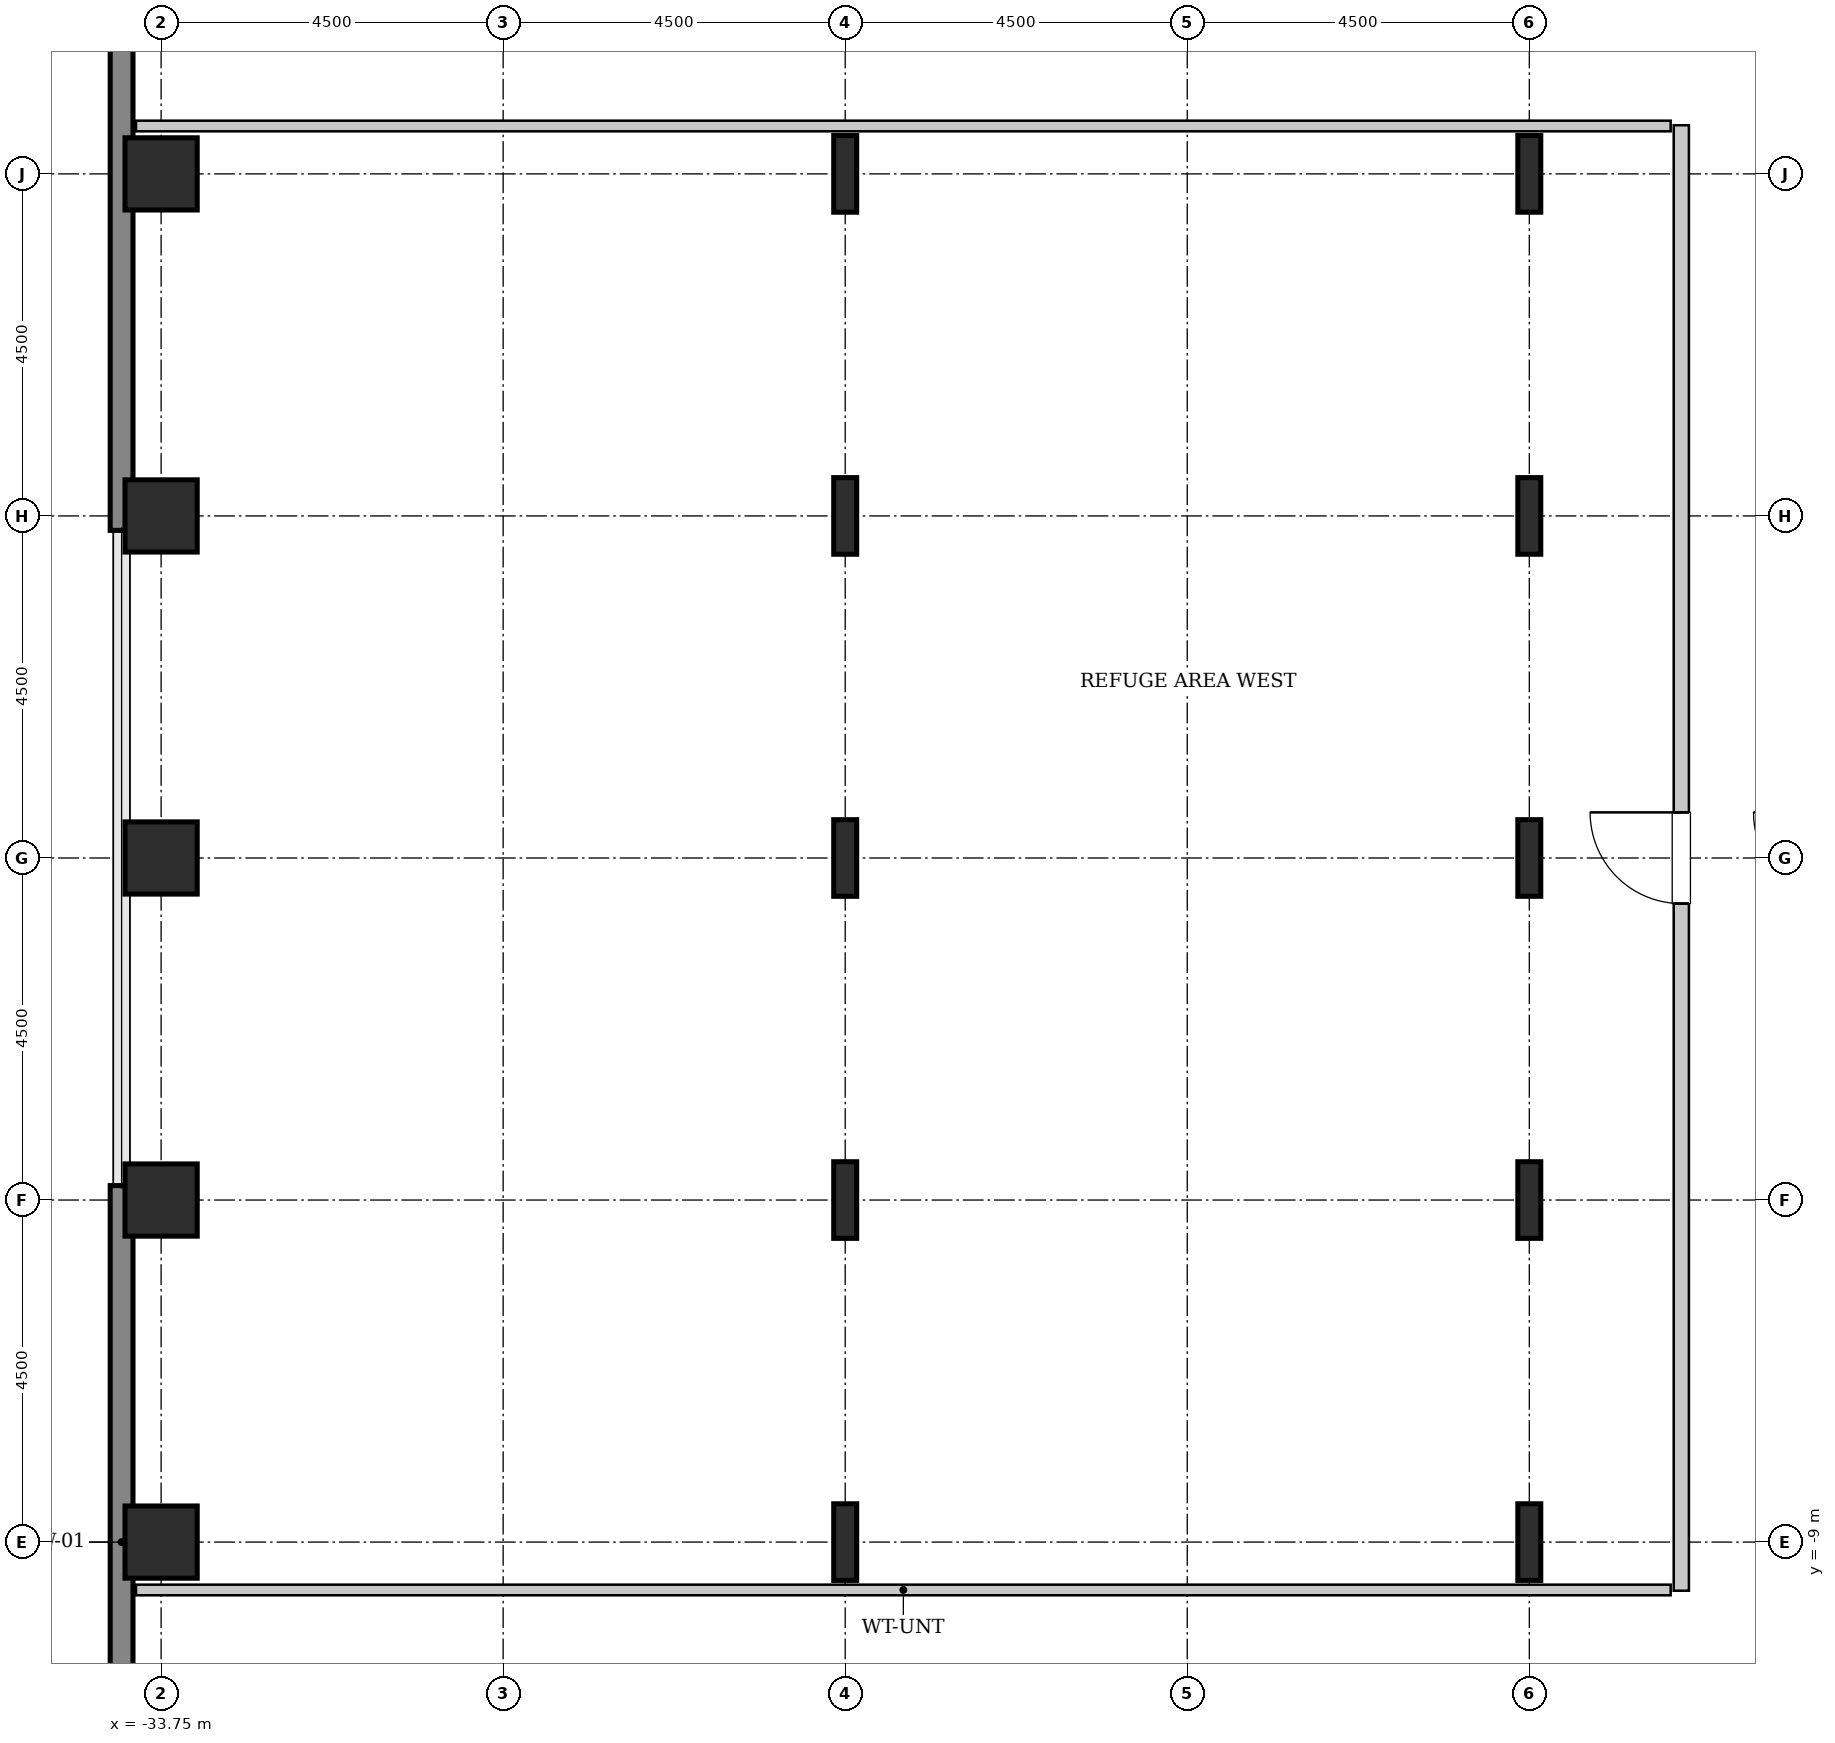
"""IFC4 building model, lengths in metres.
Left out: names, types, materials, properties, quantities, classifications, styles, units other than length and angle.
Written with IfcOpenShell. Run it as: python <this file> out.ifc"""

import sys

from ifc_helpers import new_model, si_unit, direction, frame, frame_2d, origin, origin_2d, place, context, subcontext, project, spatial, rectangle, hollow_rectangle, i_section, extrude, source, transform, mapped, element, fill, save


model = new_model("IFC4")
c1 = context("Model", 3, precision=1e-05, world=origin(), true_north=direction((0.0, 1.0)))
c2 = subcontext(c1, "Body", "Model", "MODEL_VIEW")
j1 = project(units=[si_unit("LENGTHUNIT", "METRE"), si_unit("PLANEANGLEUNIT", "RADIAN")], contexts=[c1])
p1 = place(None, origin())
s1 = spatial("IfcSite", under=j1, at=p1, CompositionType="ELEMENT")
p2 = place(p1, origin())
s2 = spatial("IfcBuilding", under=s1, at=p2, CompositionType="ELEMENT")
p3 = place(p2, frame((0.0, 0.0, 86.2)))
s3 = spatial("IfcBuildingStorey", under=s2, at=p3, CompositionType="ELEMENT", Elevation=86.2)
m1 = source(origin(), c2, "Body", "SweptSolid", [
    extrude(hollow_rectangle(XDim=0.95, YDim=0.95, WallThickness=0.045, InnerFilletRadius=0.045, OuterFilletRadius=0.09, at=origin_2d()), origin(), (0.0, 0.0, 1.0), 4.6),
])
for number, where, z_axis, x_axis in (
    (1, (-33.75, -9.0, 0.0), (0.0, 0.0, 1.0), (1.0, 0.0, 0.0)),
    (2, (-33.75, -4.5, 0.0), (0.0, 0.0, 1.0), (1.0, 0.0, 0.0)),
    (3, (-33.75, 0.0, 0.0), (0.0, 0.0, 1.0), (1.0, 0.0, 0.0)),
    (4, (-33.75, 4.5, 0.0), (0.0, 0.0, 1.0), (1.0, 0.0, 0.0)),
    (5, (-33.75, 9.0, 0.0), (0.0, 0.0, 1.0), (1.0, 0.0, 0.0)),
):
    element("IfcColumn", number, at=place(p3, frame(where, z_axis=z_axis, x_axis=x_axis)), inside=s3, PredefinedType="COLUMN", context=c2, shape_type="MappedRepresentation", body=[
        mapped(m1, transform((0.0, 0.0, 0.0), x_axis=(1.0, 0.0, 0.0), y_axis=(0.0, 1.0, 0.0), z_axis=(0.0, 0.0, 1.0), scale=1.0)),
    ])
m2 = source(origin(), c2, "Body", "SweptSolid", [
    extrude(i_section(OverallWidth=0.302, OverallDepth=1.008, WebThickness=0.021, FlangeThickness=0.04, FilletRadius=0.03, at=origin_2d()), origin(), (0.0, 0.0, 1.0), 4.6),
])
for number, where, z_axis, x_axis in (
    (6, (-24.75, -9.0, 0.0), (0.0, 0.0, 1.0), (1.0, 0.0, 0.0)),
    (7, (-24.75, -4.5, 0.0), (0.0, 0.0, 1.0), (1.0, 0.0, 0.0)),
    (8, (-24.75, 0.0, 0.0), (0.0, 0.0, 1.0), (1.0, 0.0, 0.0)),
    (9, (-24.75, 4.5, 0.0), (0.0, 0.0, 1.0), (1.0, 0.0, 0.0)),
    (10, (-24.75, 9.0, 0.0), (0.0, 0.0, 1.0), (1.0, 0.0, 0.0)),
    (11, (-15.75, -9.0, 0.0), (0.0, 0.0, 1.0), (1.0, 0.0, 0.0)),
    (12, (-15.75, -4.5, 0.0), (0.0, 0.0, 1.0), (1.0, 0.0, 0.0)),
    (13, (-15.75, 0.0, 0.0), (0.0, 0.0, 1.0), (1.0, 0.0, 0.0)),
    (14, (-15.75, 4.5, 0.0), (0.0, 0.0, 1.0), (1.0, 0.0, 0.0)),
    (15, (-15.75, 9.0, 0.0), (0.0, 0.0, 1.0), (1.0, 0.0, 0.0)),
):
    element("IfcColumn", number, at=place(p3, frame(where, z_axis=z_axis, x_axis=x_axis)), inside=s3, PredefinedType="COLUMN", context=c2, shape_type="MappedRepresentation", body=[
        mapped(m2, transform((0.0, 0.0, 0.0), x_axis=(1.0, 0.0, 0.0), y_axis=(0.0, 1.0, 0.0), z_axis=(0.0, 0.0, 1.0), scale=1.0)),
    ])
m3 = source(origin(), c2, "Body", "SweptSolid", [
    extrude(rectangle(XDim=9.38, YDim=0.3, at=frame_2d((4.69, 0.0))), origin(), (0.0, 0.0, 1.0), 4.35),
])
for number, where, z_axis, x_axis in (
    (16, (-34.27, -13.69, 0.0), (0.0, 0.0, 1.0), (0.0, 1.0, 0.0)),
    (17, (-34.27, 4.31, 0.0), (0.0, 0.0, 1.0), (0.0, 1.0, 0.0)),
):
    element("IfcWall", number, at=place(p3, frame(where, z_axis=z_axis, x_axis=x_axis)), inside=s3, PredefinedType="SHEAR", context=c2, shape_type="MappedRepresentation", body=[
        mapped(m3, transform((0.0, 0.0, 0.0), x_axis=(1.0, 0.0, 0.0), y_axis=(0.0, 1.0, 0.0), z_axis=(0.0, 0.0, 1.0), scale=1.0)),
    ])
m4 = source(origin(), c2, "Body", "SweptSolid", [
    extrude(rectangle(XDim=19.28, YDim=0.2, at=frame_2d((9.64, 0.0))), origin(), (0.0, 0.0, 1.0), 4.335),
])
p4 = place(p3, frame((-13.75, -9.64, 0.0), z_axis=(0.0, 0.0, 1.0), x_axis=(0.0, 1.0, 0.0)))
e18 = element("IfcWall", 18, at=p4, inside=s3, PredefinedType="SOLIDWALL", context=c2, shape_type="MappedRepresentation", body=[
    mapped(m4, transform((0.0, 0.0, 0.0), x_axis=(1.0, 0.0, 0.0), y_axis=(0.0, 1.0, 0.0), z_axis=(0.0, 0.0, 1.0), scale=1.0)),
])
p5 = place(p4, frame((9.04, 0.0, 0.0)))
e19 = element("IfcOpeningElement", 19, at=p5, cuts=e18, PredefinedType="OPENING", context=c2, shape_type="SweptSolid", body=[
    extrude(rectangle(XDim=1.2, YDim=2.15, at=frame_2d((0.6, 1.075))), frame((0.0, 0.11, 0.0), z_axis=(0.0, -1.0, 0.0), x_axis=(1.0, 0.0, 0.0)), (0.0, 0.0, 1.0), 0.22),
])
m5 = source(origin(), c2, "Body", "SweptSolid", [
    extrude(rectangle(XDim=20.19, YDim=0.14, at=frame_2d((10.095, 0.0))), origin(), (0.0, 0.0, 1.0), 4.335),
])
for number, where, z_axis, x_axis in (
    (20, (-34.08, -9.63, 0.0), (0.0, 0.0, 1.0), (1.0, 0.0, 0.0)),
    (21, (-34.08, 9.63, 0.0), (0.0, 0.0, 1.0), (1.0, 0.0, 0.0)),
):
    element("IfcWall", number, at=place(p3, frame(where, z_axis=z_axis, x_axis=x_axis)), inside=s3, PredefinedType="PARTITIONING", context=c2, shape_type="MappedRepresentation", body=[
        mapped(m5, transform((0.0, 0.0, 0.0), x_axis=(1.0, 0.0, 0.0), y_axis=(0.0, 1.0, 0.0), z_axis=(0.0, 0.0, 1.0), scale=1.0)),
    ])
m6 = source(origin(), c2, "Body", "SweptSolid", [
    extrude(rectangle(XDim=1.2, YDim=2.15, at=frame_2d((0.6, 1.075))), frame((0.0, 0.025, 0.0), z_axis=(0.0, -1.0, 0.0), x_axis=(1.0, 0.0, 0.0)), (0.0, 0.0, 1.0), 0.05),
])
p6 = place(p5, origin())
e22 = element("IfcDoor", 22, at=p6, inside=s3, OperationType="SINGLE_SWING_RIGHT", PredefinedType="DOOR", context=c2, shape_type="MappedRepresentation", body=[
    mapped(m6, transform((0.0, 0.0, 0.0), x_axis=(1.0, 0.0, 0.0), y_axis=(0.0, 1.0, 0.0), z_axis=(0.0, 0.0, 1.0), scale=1.0)),
])
fill(e19, e22)
save(model, sys.argv[1])
